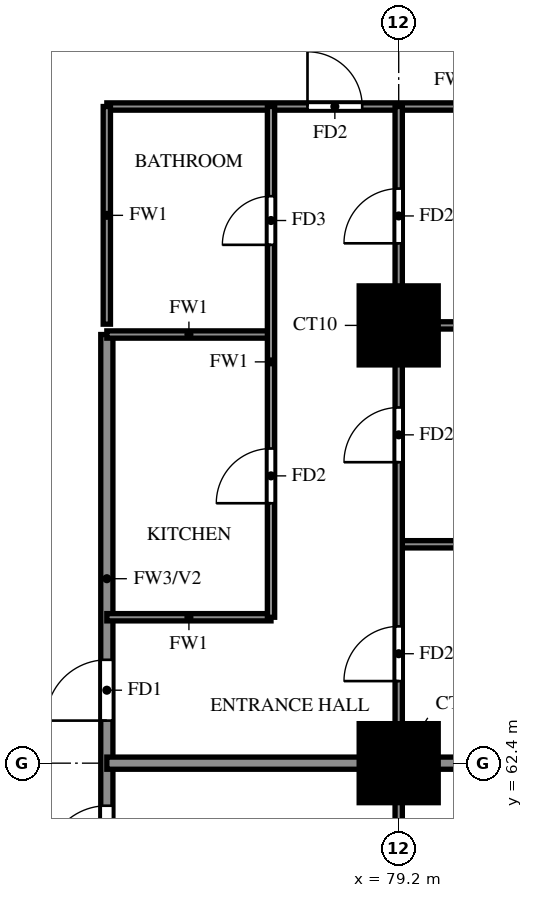
"""IFC4 building model, lengths in metres.
Left out: names, types, materials, properties, quantities, classifications, styles, units other than length and angle.
Written with IfcOpenShell. Run it as: python <this file> out.ifc"""

import sys

from ifc_helpers import new_model, si_unit, direction, frame, frame_2d, origin, origin_2d, place, context, subcontext, project, spatial, rectangle, extrude, source, transform, mapped, element, fill, save


model = new_model("IFC4")
c1 = context("Model", 3, precision=1e-05, world=origin(), true_north=direction((0.0, 1.0)))
c2 = subcontext(c1, "Body", "Model", "MODEL_VIEW")
j1 = project(units=[si_unit("LENGTHUNIT", "METRE"), si_unit("PLANEANGLEUNIT", "RADIAN")], contexts=[c1])
p1 = place(None, origin())
s1 = spatial("IfcSite", under=j1, at=p1, CompositionType="ELEMENT")
p2 = place(p1, origin())
s2 = spatial("IfcBuilding", under=s1, at=p2, CompositionType="ELEMENT")
p3 = place(p2, frame((0.0, 0.0, 72.5)))
s3 = spatial("IfcBuildingStorey", under=s2, at=p3, CompositionType="ELEMENT", Elevation=72.5)
m1 = source(origin(), c2, "Body", "SweptSolid", [
    extrude(rectangle(XDim=1.3, YDim=1.3, at=origin_2d()), origin(), (0.0, 0.0, 1.0), 3.18),
])
for number, where, z_axis, x_axis in (
    (1, (79.2, 62.4, 0.0), (0.0, 0.0, 1.0), (1.0, 0.0, 0.0)),
    (2, (79.2, 69.6, 0.0), (0.0, 0.0, 1.0), (1.0, 0.0, 0.0)),
):
    element("IfcColumn", number, at=place(p3, frame(where, z_axis=z_axis, x_axis=x_axis)), inside=s3, PredefinedType="COLUMN", context=c2, shape_type="MappedRepresentation", body=[
        mapped(m1, transform((0.0, 0.0, 0.0))),
    ])
p4 = place(p3, frame((74.4, 60.0, 0.0), z_axis=(0.0, 0.0, 1.0), x_axis=(0.0, 1.0, 0.0)))
e3 = element("IfcWall", 3, at=p4, inside=s3, PredefinedType="SOLIDWALL", context=c2, shape_type="SweptSolid", body=[
    extrude(rectangle(XDim=9.45, YDim=0.2, at=frame_2d((4.725, 0.0))), origin(), (0.0, 0.0, 1.0), 3.18),
])
p5 = place(p4, frame((0.7, 0.0, 0.0)))
e4 = element("IfcOpeningElement", 4, at=p5, cuts=e3, PredefinedType="OPENING", context=c2, shape_type="SweptSolid", body=[
    extrude(rectangle(XDim=1.0, YDim=2.1, at=frame_2d((0.5, 1.05))), frame((0.0, 0.11, 0.0), z_axis=(0.0, -1.0, 0.0), x_axis=(1.0, 0.0, 0.0)), (0.0, 0.0, 1.0), 0.22),
])
p6 = place(p4, frame((3.1, 0.0, 0.0)))
e5 = element("IfcOpeningElement", 5, at=p6, cuts=e3, PredefinedType="OPENING", context=c2, shape_type="SweptSolid", body=[
    extrude(rectangle(XDim=1.0, YDim=2.1, at=frame_2d((0.5, 1.05))), frame((0.0, 0.11, 0.0), z_axis=(0.0, -1.0, 0.0), x_axis=(1.0, 0.0, 0.0)), (0.0, 0.0, 1.0), 0.22),
])
p7 = place(p3, frame((74.4, 62.4, 0.0), z_axis=(0.0, 0.0, 1.0), x_axis=(1.0, 0.0, 0.0)))
e6 = element("IfcWall", 6, at=p7, inside=s3, PredefinedType="SOLIDWALL", context=c2, shape_type="SweptSolid", body=[
    extrude(rectangle(XDim=11.875, YDim=0.2, at=frame_2d((5.938, 0.0))), origin(), (0.0, 0.0, 1.0), 3.18),
])
p8 = place(p3, frame((74.4, 64.8, 0.0), z_axis=(0.0, 0.0, 1.0), x_axis=(1.0, 0.0, 0.0)))
e7 = element("IfcWall", 7, at=p8, inside=s3, PredefinedType="PARTITIONING", context=c2, shape_type="SweptSolid", body=[
    extrude(rectangle(XDim=2.7, YDim=0.12, at=frame_2d((1.35, 0.0))), origin(), (0.0, 0.0, 1.0), 3.18),
])
p9 = place(p3, frame((79.2, 66.0, 0.0), z_axis=(0.0, 0.0, 1.0), x_axis=(1.0, 0.0, 0.0)))
e8 = element("IfcWall", 8, at=p9, inside=s3, PredefinedType="PARTITIONING", context=c2, shape_type="SweptSolid", body=[
    extrude(rectangle(XDim=7.075, YDim=0.12, at=frame_2d((3.538, 0.0))), origin(), (0.0, 0.0, 1.0), 2.28),
])
p10 = place(p3, frame((74.4, 69.45, 0.0), z_axis=(0.0, 0.0, 1.0), x_axis=(1.0, 0.0, 0.0)))
e9 = element("IfcWall", 9, at=p10, inside=s3, PredefinedType="PARTITIONING", context=c2, shape_type="SweptSolid", body=[
    extrude(rectangle(XDim=2.7, YDim=0.12, at=frame_2d((1.35, 0.0))), origin(), (0.0, 0.0, 1.0), 3.18),
])
p11 = place(p3, frame((79.2, 69.6, 0.0), z_axis=(0.0, 0.0, 1.0), x_axis=(1.0, 0.0, 0.0)))
e10 = element("IfcWall", 10, at=p11, inside=s3, PredefinedType="PARTITIONING", context=c2, shape_type="SweptSolid", body=[
    extrude(rectangle(XDim=7.075, YDim=0.12, at=frame_2d((3.538, 0.0))), origin(), (0.0, 0.0, 1.0), 3.18),
])
p12 = place(p3, frame((74.4, 73.2, 0.0), z_axis=(0.0, 0.0, 1.0), x_axis=(1.0, 0.0, 0.0)))
e11 = element("IfcWall", 11, at=p12, inside=s3, PredefinedType="PARTITIONING", context=c2, shape_type="SweptSolid", body=[
    extrude(rectangle(XDim=11.875, YDim=0.12, at=frame_2d((5.938, 0.0))), origin(), (0.0, 0.0, 1.0), 2.28),
])
p13 = place(p12, frame((3.3, 0.0, 0.0)))
e12 = element("IfcOpeningElement", 12, at=p13, cuts=e11, PredefinedType="OPENING", context=c2, shape_type="SweptSolid", body=[
    extrude(rectangle(XDim=0.9, YDim=2.1, at=frame_2d((0.45, 1.05))), frame((0.0, 0.07, 0.0), z_axis=(0.0, -1.0, 0.0), x_axis=(1.0, 0.0, 0.0)), (0.0, 0.0, 1.0), 0.14),
])
p14 = place(p3, frame((74.4, 69.62, 0.0), z_axis=(0.0, 0.0, 1.0), x_axis=(0.0, 1.0, 0.0)))
e13 = element("IfcWall", 13, at=p14, inside=s3, PredefinedType="PARTITIONING", context=c2, shape_type="SweptSolid", body=[
    extrude(rectangle(XDim=3.58, YDim=0.12, at=frame_2d((1.79, 0.0))), origin(), (0.0, 0.0, 1.0), 3.18),
])
p15 = place(p3, frame((77.1, 64.8, 0.0), z_axis=(0.0, 0.0, 1.0), x_axis=(0.0, 1.0, 0.0)))
e14 = element("IfcWall", 14, at=p15, inside=s3, PredefinedType="PARTITIONING", context=c2, shape_type="SweptSolid", body=[
    extrude(rectangle(XDim=8.4, YDim=0.12, at=frame_2d((4.2, 0.0))), origin(), (0.0, 0.0, 1.0), 3.18),
])
p16 = place(p15, frame((1.875, 0.0, 0.0)))
e15 = element("IfcOpeningElement", 15, at=p16, cuts=e14, PredefinedType="OPENING", context=c2, shape_type="SweptSolid", body=[
    extrude(rectangle(XDim=0.9, YDim=2.1, at=frame_2d((0.45, 1.05))), frame((0.0, 0.07, 0.0), z_axis=(0.0, -1.0, 0.0), x_axis=(1.0, 0.0, 0.0)), (0.0, 0.0, 1.0), 0.14),
])
p17 = place(p15, frame((6.125, 0.0, 0.0)))
e16 = element("IfcOpeningElement", 16, at=p17, cuts=e14, PredefinedType="OPENING", context=c2, shape_type="SweptSolid", body=[
    extrude(rectangle(XDim=0.8, YDim=2.1, at=frame_2d((0.4, 1.05))), frame((0.0, 0.07, 0.0), z_axis=(0.0, -1.0, 0.0), x_axis=(1.0, 0.0, 0.0)), (0.0, 0.0, 1.0), 0.14),
])
p18 = place(p3, frame((79.2, 48.125, 0.0), z_axis=(0.0, 0.0, 1.0), x_axis=(0.0, 1.0, 0.0)))
e17 = element("IfcWall", 17, at=p18, inside=s3, PredefinedType="PARTITIONING", context=c2, shape_type="SweptSolid", body=[
    extrude(rectangle(XDim=25.075, YDim=0.12, at=frame_2d((12.538, 0.0))), origin(), (0.0, 0.0, 1.0), 3.18),
])
p19 = place(p18, frame((2.788, 0.0, 0.0)))
e18 = element("IfcOpeningElement", 18, at=p19, cuts=e17, PredefinedType="OPENING", context=c2, shape_type="SweptSolid", body=[
    extrude(rectangle(XDim=1.5, YDim=2.1, at=frame_2d((0.75, 1.05))), frame((0.0, 0.07, 0.0), z_axis=(0.0, -1.0, 0.0), x_axis=(1.0, 0.0, 0.0)), (0.0, 0.0, 1.0), 0.14),
])
p20 = place(p18, frame((8.425, 0.0, 0.0)))
e19 = element("IfcOpeningElement", 19, at=p20, cuts=e17, PredefinedType="OPENING", context=c2, shape_type="SweptSolid", body=[
    extrude(rectangle(XDim=0.9, YDim=2.1, at=frame_2d((0.45, 1.05))), frame((0.0, 0.07, 0.0), z_axis=(0.0, -1.0, 0.0), x_axis=(1.0, 0.0, 0.0)), (0.0, 0.0, 1.0), 0.14),
])
p21 = place(p18, frame((12.025, 0.0, 0.0)))
e20 = element("IfcOpeningElement", 20, at=p21, cuts=e17, PredefinedType="OPENING", context=c2, shape_type="SweptSolid", body=[
    extrude(rectangle(XDim=0.9, YDim=2.1, at=frame_2d((0.45, 1.05))), frame((0.0, 0.07, 0.0), z_axis=(0.0, -1.0, 0.0), x_axis=(1.0, 0.0, 0.0)), (0.0, 0.0, 1.0), 0.14),
])
p22 = place(p18, frame((15.625, 0.0, 0.0)))
e21 = element("IfcOpeningElement", 21, at=p22, cuts=e17, PredefinedType="OPENING", context=c2, shape_type="SweptSolid", body=[
    extrude(rectangle(XDim=0.9, YDim=2.1, at=frame_2d((0.45, 1.05))), frame((0.0, 0.07, 0.0), z_axis=(0.0, -1.0, 0.0), x_axis=(1.0, 0.0, 0.0)), (0.0, 0.0, 1.0), 0.14),
])
p23 = place(p18, frame((19.225, 0.0, 0.0)))
e22 = element("IfcOpeningElement", 22, at=p23, cuts=e17, PredefinedType="OPENING", context=c2, shape_type="SweptSolid", body=[
    extrude(rectangle(XDim=0.9, YDim=2.1, at=frame_2d((0.45, 1.05))), frame((0.0, 0.07, 0.0), z_axis=(0.0, -1.0, 0.0), x_axis=(1.0, 0.0, 0.0)), (0.0, 0.0, 1.0), 0.14),
])
p24 = place(p18, frame((22.825, 0.0, 0.0)))
e23 = element("IfcOpeningElement", 23, at=p24, cuts=e17, PredefinedType="OPENING", context=c2, shape_type="SweptSolid", body=[
    extrude(rectangle(XDim=0.9, YDim=2.1, at=frame_2d((0.45, 1.05))), frame((0.0, 0.07, 0.0), z_axis=(0.0, -1.0, 0.0), x_axis=(1.0, 0.0, 0.0)), (0.0, 0.0, 1.0), 0.14),
])
p25 = place(p5, origin())
e24 = element("IfcDoor", 24, at=p25, inside=s3, OperationType="SINGLE_SWING_LEFT", PredefinedType="DOOR", context=c2, shape_type="SweptSolid", body=[
    extrude(rectangle(XDim=1.0, YDim=2.1, at=frame_2d((0.5, 1.05))), frame((0.0, 0.025, 0.0), z_axis=(0.0, -1.0, 0.0), x_axis=(1.0, 0.0, 0.0)), (0.0, 0.0, 1.0), 0.05),
])
fill(e4, e24)
p26 = place(p6, origin())
e25 = element("IfcDoor", 25, at=p26, inside=s3, OperationType="SINGLE_SWING_LEFT", PredefinedType="DOOR", context=c2, shape_type="SweptSolid", body=[
    extrude(rectangle(XDim=1.0, YDim=2.1, at=frame_2d((0.5, 1.05))), frame((0.0, 0.025, 0.0), z_axis=(0.0, -1.0, 0.0), x_axis=(1.0, 0.0, 0.0)), (0.0, 0.0, 1.0), 0.05),
])
fill(e5, e25)
p27 = place(p22, origin())
e26 = element("IfcDoor", 26, at=p27, inside=s3, OperationType="SINGLE_SWING_RIGHT", PredefinedType="DOOR", context=c2, shape_type="SweptSolid", body=[
    extrude(rectangle(XDim=0.9, YDim=2.1, at=frame_2d((0.45, 1.05))), frame((0.0, 0.025, 0.0), z_axis=(0.0, -1.0, 0.0), x_axis=(1.0, 0.0, 0.0)), (0.0, 0.0, 1.0), 0.05),
])
fill(e21, e26)
p28 = place(p23, origin())
e27 = element("IfcDoor", 27, at=p28, inside=s3, OperationType="SINGLE_SWING_LEFT", PredefinedType="DOOR", context=c2, shape_type="SweptSolid", body=[
    extrude(rectangle(XDim=0.9, YDim=2.1, at=frame_2d((0.45, 1.05))), frame((0.0, 0.025, 0.0), z_axis=(0.0, -1.0, 0.0), x_axis=(1.0, 0.0, 0.0)), (0.0, 0.0, 1.0), 0.05),
])
fill(e22, e27)
p29 = place(p24, origin())
e28 = element("IfcDoor", 28, at=p29, inside=s3, OperationType="SINGLE_SWING_LEFT", PredefinedType="DOOR", context=c2, shape_type="SweptSolid", body=[
    extrude(rectangle(XDim=0.9, YDim=2.1, at=frame_2d((0.45, 1.05))), frame((0.0, 0.025, 0.0), z_axis=(0.0, -1.0, 0.0), x_axis=(1.0, 0.0, 0.0)), (0.0, 0.0, 1.0), 0.05),
])
fill(e23, e28)
p30 = place(p13, origin())
e29 = element("IfcDoor", 29, at=p30, inside=s3, OperationType="SINGLE_SWING_RIGHT", PredefinedType="DOOR", context=c2, shape_type="SweptSolid", body=[
    extrude(rectangle(XDim=0.9, YDim=2.1, at=frame_2d((0.45, 1.05))), frame((0.0, 0.025, 0.0), z_axis=(0.0, -1.0, 0.0), x_axis=(1.0, 0.0, 0.0)), (0.0, 0.0, 1.0), 0.05),
])
fill(e12, e29)
p31 = place(p16, origin())
e30 = element("IfcDoor", 30, at=p31, inside=s3, OperationType="SINGLE_SWING_LEFT", PredefinedType="DOOR", context=c2, shape_type="SweptSolid", body=[
    extrude(rectangle(XDim=0.9, YDim=2.1, at=frame_2d((0.45, 1.05))), frame((0.0, 0.025, 0.0), z_axis=(0.0, -1.0, 0.0), x_axis=(1.0, 0.0, 0.0)), (0.0, 0.0, 1.0), 0.05),
])
fill(e15, e30)
p32 = place(p17, origin())
e31 = element("IfcDoor", 31, at=p32, inside=s3, OperationType="SINGLE_SWING_LEFT", PredefinedType="DOOR", context=c2, shape_type="SweptSolid", body=[
    extrude(rectangle(XDim=0.8, YDim=2.1, at=frame_2d((0.4, 1.05))), frame((0.0, 0.025, 0.0), z_axis=(0.0, -1.0, 0.0), x_axis=(1.0, 0.0, 0.0)), (0.0, 0.0, 1.0), 0.05),
])
fill(e16, e31)
save(model, sys.argv[1])
